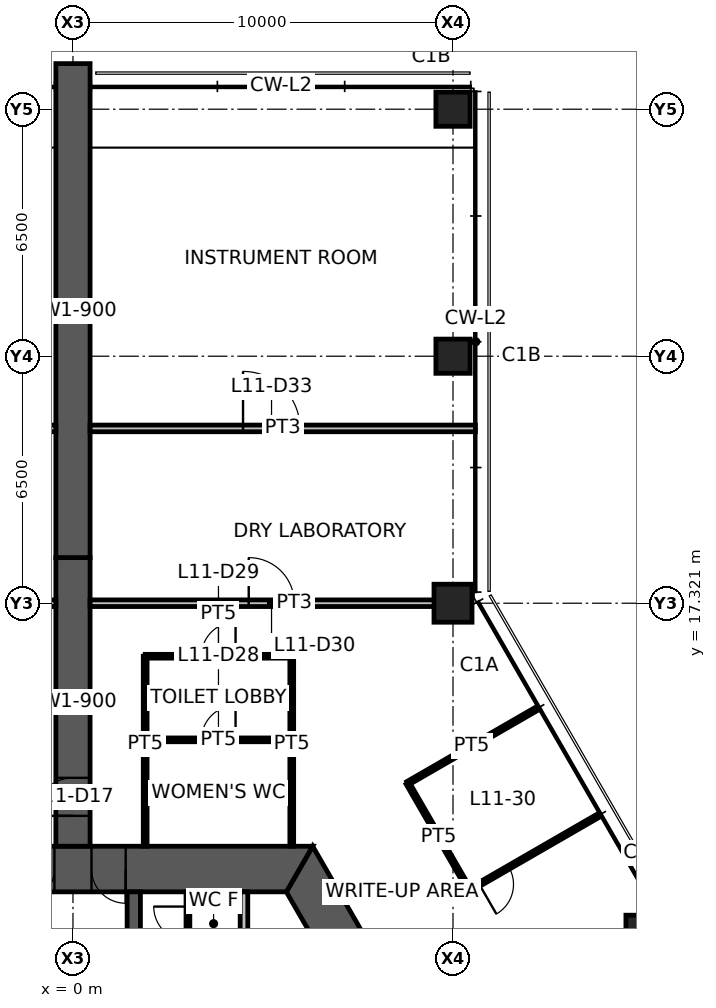
"""IFC4 building model, lengths in metres.
Left out: names, types, materials, properties, quantities, classifications, styles, units other than length and angle.
Written with IfcOpenShell. Run it as: python <this file> out.ifc"""

import sys

from ifc_helpers import new_model, si_unit, direction, frame, frame_2d, origin, origin_2d, place, context, subcontext, project, spatial, polyline, rectangle, hollow_rectangle, outline, extrude, element, fill, save


model = new_model("IFC4")
c1 = context("Model", 3, precision=1e-05, world=origin(), true_north=direction((0.0, 1.0)))
c2 = subcontext(c1, "Body", "Model", "MODEL_VIEW")
j1 = project(units=[si_unit("LENGTHUNIT", "METRE"), si_unit("PLANEANGLEUNIT", "RADIAN")], contexts=[c1])
p1 = place(None, origin())
s1 = spatial("IfcSite", under=j1, at=p1, CompositionType="ELEMENT")
p2 = place(p1, origin())
s2 = spatial("IfcBuilding", under=s1, at=p2, CompositionType="ELEMENT")
p3 = place(p2, frame((0.0, 0.0, 43.6)))
s3 = spatial("IfcBuildingStorey", under=s2, at=p3, CompositionType="ELEMENT", Elevation=43.6)
p4 = place(p3, frame((10.0, 17.321, 0.0), z_axis=(0.0, 0.0, 1.0), x_axis=(1.0, 0.0, 0.0)))
e1 = element("IfcColumn", 1, at=p4, inside=s3, PredefinedType="COLUMN", context=c2, shape_type="SweptSolid", body=[
    extrude(hollow_rectangle(XDim=1.0, YDim=1.0, WallThickness=0.06, at=origin_2d()), origin(), (0.0, 0.0, 1.0), 4.2),
])
for number, where, z_axis, x_axis in (
    (2, (15.0, 8.66, 0.0), (0.0, 0.0, 1.0), (1.0, 0.0, 0.0)),
    (3, (10.0, 23.821, 0.0), (0.0, 0.0, 1.0), (1.0, 0.0, 0.0)),
    (4, (10.0, 30.321, 0.0), (0.0, 0.0, 1.0), (1.0, 0.0, 0.0)),
):
    element("IfcColumn", number, at=place(p3, frame(where, z_axis=z_axis, x_axis=x_axis)), inside=s3, PredefinedType="COLUMN", context=c2, shape_type="SweptSolid", body=[
        extrude(hollow_rectangle(XDim=0.9, YDim=0.9, WallThickness=0.05, at=origin_2d()), origin(), (0.0, 0.0, 1.0), 4.2),
    ])
p5 = place(p3, frame((11.922, 0.0, 0.0), z_axis=(0.0, 0.0, 1.0), x_axis=(-0.500004296715, 0.866022923061, 0.0)))
e5 = element("IfcWall", 5, at=p5, inside=s3, PredefinedType="SHEAR", context=c2, shape_type="SweptSolid", body=[
    extrude(outline(polyline([(-0.346, -0.6), (5.835, -0.6), (6.635, -0.6), (12.269, -0.6), (11.576, 0.6), (6.635, 0.6), (5.835, 0.6), (0.346, 0.6), (-0.346, -0.6)])), origin(), (0.0, 0.0, 1.0), 4.2),
])
p6 = place(p5, frame((5.835, 0.0, 0.0)))
e6 = element("IfcOpeningElement", 6, at=p6, cuts=e5, PredefinedType="OPENING", context=c2, shape_type="SweptSolid", body=[
    extrude(rectangle(XDim=0.8, YDim=2.1, at=frame_2d((0.4, 1.05))), frame((0.0, 0.61, 0.0), z_axis=(0.0, -1.0, 0.0), x_axis=(1.0, 0.0, 0.0)), (0.0, 0.0, 1.0), 1.22),
])
p7 = place(p3, frame((5.961, 10.325, 0.0), z_axis=(0.0, 0.0, 1.0), x_axis=(-1.0, 0.0, 0.0)))
e7 = element("IfcWall", 7, at=p7, inside=s3, PredefinedType="SHEAR", context=c2, shape_type="SweptSolid", body=[
    extrude(outline(polyline([(-0.346, -0.6), (4.574, -0.6), (5.474, -0.6), (6.449, -0.6), (7.349, -0.6), (12.269, -0.6), (11.576, 0.6), (7.349, 0.6), (6.449, 0.6), (5.474, 0.6), (4.574, 0.6), (0.346, 0.6), (-0.346, -0.6)])), origin(), (0.0, 0.0, 1.0), 4.2),
])
p8 = place(p7, frame((6.449, 0.0, 0.0)))
e8 = element("IfcOpeningElement", 8, at=p8, cuts=e7, PredefinedType="OPENING", context=c2, shape_type="SweptSolid", body=[
    extrude(rectangle(XDim=0.9, YDim=2.1, at=frame_2d((0.45, 1.05))), frame((0.0, 0.61, 0.0), z_axis=(0.0, -1.0, 0.0), x_axis=(1.0, 0.0, 0.0)), (0.0, 0.0, 1.0), 1.22),
])
p9 = place(p7, frame((4.574, 0.0, 0.0)))
e9 = element("IfcOpeningElement", 9, at=p9, cuts=e7, PredefinedType="OPENING", context=c2, shape_type="SweptSolid", body=[
    extrude(rectangle(XDim=0.9, YDim=2.1, at=frame_2d((0.45, 1.05))), frame((0.0, 0.61, 0.0), z_axis=(0.0, -1.0, 0.0), x_axis=(1.0, 0.0, 0.0)), (0.0, 0.0, 1.0), 1.22),
])
p10 = place(p3, frame((0.0, 10.925, 0.0), z_axis=(0.0, 0.0, 1.0), x_axis=(0.0, 1.0, 0.0)))
e10 = element("IfcWall", 10, at=p10, inside=s3, PredefinedType="SHEAR", context=c2, shape_type="SweptSolid", body=[
    extrude(rectangle(XDim=7.595, YDim=0.9, at=frame_2d((3.798, 0.0))), origin(), (0.0, 0.0, 1.0), 4.2),
])
p11 = place(p10, frame((0.8, 0.0, 0.0)))
e11 = element("IfcOpeningElement", 11, at=p11, cuts=e10, PredefinedType="OPENING", context=c2, shape_type="SweptSolid", body=[
    extrude(rectangle(XDim=1.0, YDim=2.1, at=frame_2d((0.5, 1.05))), frame((0.0, 0.46, 0.0), z_axis=(0.0, -1.0, 0.0), x_axis=(1.0, 0.0, 0.0)), (0.0, 0.0, 1.0), 0.92),
])
p12 = place(p3, frame((0.0, 18.521, 0.0), z_axis=(0.0, 0.0, 1.0), x_axis=(0.0, 1.0, 0.0)))
e12 = element("IfcWall", 12, at=p12, inside=s3, PredefinedType="SHEAR", context=c2, shape_type="SweptSolid", body=[
    extrude(rectangle(XDim=13.0, YDim=0.9, at=frame_2d((6.5, 0.0))), origin(), (0.0, 0.0, 1.0), 4.2),
])
p13 = place(p3, frame((1.6, 3.775, 0.0), z_axis=(0.0, 0.0, 1.0), x_axis=(0.0, 1.0, 0.0)))
e13 = element("IfcWall", 13, at=p13, inside=s3, PredefinedType="SHEAR", context=c2, shape_type="SweptSolid", body=[
    extrude(rectangle(XDim=5.95, YDim=0.35, at=frame_2d((2.975, 0.0))), origin(), (0.0, 0.0, 1.0), 4.2),
])
p14 = place(p13, frame((3.775, 0.0, 0.0)))
e14 = element("IfcOpeningElement", 14, at=p14, cuts=e13, PredefinedType="OPENING", context=c2, shape_type="SweptSolid", body=[
    extrude(rectangle(XDim=0.9, YDim=2.1, at=frame_2d((0.45, 1.05))), frame((0.0, 0.185, 0.0), z_axis=(0.0, -1.0, 0.0), x_axis=(1.0, 0.0, 0.0)), (0.0, 0.0, 1.0), 0.37),
])
p15 = place(p3, frame((4.5, 7.175, 0.0), z_axis=(0.0, 0.0, 1.0), x_axis=(0.0, 1.0, 0.0)))
e15 = element("IfcWall", 15, at=p15, inside=s3, PredefinedType="STANDARD", context=c2, shape_type="SweptSolid", body=[
    extrude(rectangle(XDim=2.55, YDim=0.2, at=frame_2d((1.275, 0.0))), origin(), (0.0, 0.0, 1.0), 4.2),
])
p16 = place(p3, frame((3.025, 6.575, 0.0), z_axis=(0.0, 0.0, 1.0), x_axis=(0.0, 1.0, 0.0)))
e16 = element("IfcWall", 16, at=p16, inside=s3, PredefinedType="PARTITIONING", context=c2, shape_type="SweptSolid", body=[
    extrude(rectangle(XDim=3.15, YDim=0.1, at=frame_2d((1.575, 0.0))), origin(), (0.0, 0.0, 1.0), 3.23),
])
p17 = place(p16, frame((1.863, 0.0, 0.0)))
e17 = element("IfcOpeningElement", 17, at=p17, cuts=e16, PredefinedType="OPENING", context=c2, shape_type="SweptSolid", body=[
    extrude(rectangle(XDim=0.9, YDim=2.1, at=frame_2d((0.45, 1.05))), frame((0.0, 0.06, 0.0), z_axis=(0.0, -1.0, 0.0), x_axis=(1.0, 0.0, 0.0)), (0.0, 0.0, 1.0), 0.12),
])
p18 = place(p16, frame((0.363, 0.0, 0.0)))
e18 = element("IfcOpeningElement", 18, at=p18, cuts=e16, PredefinedType="OPENING", context=c2, shape_type="SweptSolid", body=[
    extrude(rectangle(XDim=0.9, YDim=2.1, at=frame_2d((0.45, 1.05))), frame((0.0, 0.06, 0.0), z_axis=(0.0, -1.0, 0.0), x_axis=(1.0, 0.0, 0.0)), (0.0, 0.0, 1.0), 0.12),
])
p19 = place(p3, frame((1.9, 13.725, 0.0), z_axis=(0.0, 0.0, 1.0), x_axis=(1.0, 0.0, 0.0)))
e19 = element("IfcWall", 19, at=p19, inside=s3, PredefinedType="PARTITIONING", context=c2, shape_type="SweptSolid", body=[
    extrude(rectangle(XDim=3.857, YDim=0.1, at=frame_2d((1.929, 0.0))), origin(), (0.0, 0.0, 1.0), 3.23),
])
p20 = place(p19, frame((1.479, 0.0, 0.0)))
e20 = element("IfcOpeningElement", 20, at=p20, cuts=e19, PredefinedType="OPENING", context=c2, shape_type="SweptSolid", body=[
    extrude(rectangle(XDim=0.9, YDim=2.1, at=frame_2d((0.45, 1.05))), frame((0.0, 0.06, 0.0), z_axis=(0.0, -1.0, 0.0), x_axis=(1.0, 0.0, 0.0)), (0.0, 0.0, 1.0), 0.12),
])
p21 = place(p3, frame((1.9, 15.925, 0.0), z_axis=(0.0, 0.0, 1.0), x_axis=(1.0, 0.0, 0.0)))
e21 = element("IfcWall", 21, at=p21, inside=s3, PredefinedType="PARTITIONING", context=c2, shape_type="SweptSolid", body=[
    extrude(rectangle(XDim=3.857, YDim=0.1, at=frame_2d((1.929, 0.0))), origin(), (0.0, 0.0, 1.0), 3.23),
])
p22 = place(p21, frame((1.479, 0.0, 0.0)))
e22 = element("IfcOpeningElement", 22, at=p22, cuts=e21, PredefinedType="OPENING", context=c2, shape_type="SweptSolid", body=[
    extrude(rectangle(XDim=0.9, YDim=2.1, at=frame_2d((0.45, 1.05))), frame((0.0, 0.06, 0.0), z_axis=(0.0, -1.0, 0.0), x_axis=(1.0, 0.0, 0.0)), (0.0, 0.0, 1.0), 0.12),
])
for number, where, z_axis, x_axis in (
    (23, (1.9, 10.925, 0.0), (0.0, 0.0, 1.0), (0.0, 1.0, 0.0)),
    (24, (5.757, 10.925, 0.0), (0.0, 0.0, 1.0), (0.0, 1.0, 0.0)),
):
    element("IfcWall", number, at=place(p3, frame(where, z_axis=z_axis, x_axis=x_axis)), inside=s3, PredefinedType="PARTITIONING", context=c2, shape_type="SweptSolid", body=[
        extrude(rectangle(XDim=5.0, YDim=0.1, at=frame_2d((2.5, 0.0))), origin(), (0.0, 0.0, 1.0), 3.23),
    ])
p23 = place(p3, frame((0.45, 17.321, 0.0), z_axis=(0.0, 0.0, 1.0), x_axis=(1.0, 0.0, 0.0)))
e25 = element("IfcWall", 25, at=p23, inside=s3, PredefinedType="PARTITIONING", context=c2, shape_type="SweptSolid", body=[
    extrude(rectangle(XDim=9.55, YDim=0.175, at=frame_2d((4.775, 0.0))), origin(), (0.0, 0.0, 1.0), 3.238),
])
p24 = place(p23, frame((4.175, 0.0, 0.0)))
e26 = element("IfcOpeningElement", 26, at=p24, cuts=e25, PredefinedType="OPENING", context=c2, shape_type="SweptSolid", body=[
    extrude(rectangle(XDim=1.2, YDim=2.1, at=frame_2d((0.6, 1.05))), frame((0.0, 0.098, 0.0), z_axis=(0.0, -1.0, 0.0), x_axis=(1.0, 0.0, 0.0)), (0.0, 0.0, 1.0), 0.195),
])
p25 = place(p3, frame((8.809, 12.583, 0.0), z_axis=(0.0, 0.0, 1.0), x_axis=(0.866027358884, 0.499996613652, 0.0)))
e27 = element("IfcWall", 27, at=p25, inside=s3, PredefinedType="PARTITIONING", context=c2, shape_type="SweptSolid", body=[
    extrude(rectangle(XDim=3.88, YDim=0.1, at=frame_2d((1.94, 0.0))), origin(), (0.0, 0.0, 1.0), 3.23),
])
p26 = place(p3, frame((10.432, 9.772, 0.0), z_axis=(0.0, 0.0, 1.0), x_axis=(-0.500013214685, 0.866017774148, 0.0)))
e28 = element("IfcWall", 28, at=p26, inside=s3, PredefinedType="PARTITIONING", context=c2, shape_type="SweptSolid", body=[
    extrude(rectangle(XDim=3.247, YDim=0.1, at=frame_2d((1.623, 0.0))), origin(), (0.0, 0.0, 1.0), 3.23),
])
p27 = place(p3, frame((13.792, 11.712, 0.0), z_axis=(0.0, 0.0, 1.0), x_axis=(-0.866027358884, -0.499996613652, 0.0)))
e29 = element("IfcWall", 29, at=p27, inside=s3, PredefinedType="PARTITIONING", context=c2, shape_type="SweptSolid", body=[
    extrude(rectangle(XDim=3.88, YDim=0.1, at=frame_2d((1.94, 0.0))), origin(), (0.0, 0.0, 1.0), 3.23),
])
p28 = place(p27, frame((2.68, 0.0, 0.0)))
e30 = element("IfcOpeningElement", 30, at=p28, cuts=e29, PredefinedType="OPENING", context=c2, shape_type="SweptSolid", body=[
    extrude(rectangle(XDim=0.9, YDim=2.1, at=frame_2d((0.45, 1.05))), frame((0.0, 0.06, 0.0), z_axis=(0.0, -1.0, 0.0), x_axis=(1.0, 0.0, 0.0)), (0.0, 0.0, 1.0), 0.12),
])
p29 = place(p3, frame((0.45, 21.92, 0.0), z_axis=(0.0, 0.0, 1.0), x_axis=(1.0, 0.0, 0.0)))
e31 = element("IfcWall", 31, at=p29, inside=s3, PredefinedType="PARTITIONING", context=c2, shape_type="SweptSolid", body=[
    extrude(rectangle(XDim=10.14, YDim=0.175, at=frame_2d((5.07, 0.0))), origin(), (0.0, 0.0, 1.0), 4.03),
])
p30 = place(p29, frame((4.025, 0.0, 0.0)))
e32 = element("IfcOpeningElement", 32, at=p30, cuts=e31, PredefinedType="OPENING", context=c2, shape_type="SweptSolid", body=[
    extrude(rectangle(XDim=1.5, YDim=2.1, at=frame_2d((0.75, 1.05))), frame((0.0, 0.098, 0.0), z_axis=(0.0, -1.0, 0.0), x_axis=(1.0, 0.0, 0.0)), (0.0, 0.0, 1.0), 0.195),
])
p31 = place(p3, frame((-0.45, 17.321, 0.0), z_axis=(0.0, 0.0, 1.0), x_axis=(-1.0, 0.0, 0.0)))
e33 = element("IfcWall", 33, at=p31, inside=s3, PredefinedType="PARTITIONING", context=c2, shape_type="SweptSolid", body=[
    extrude(rectangle(XDim=9.55, YDim=0.175, at=frame_2d((4.775, 0.0))), origin(), (0.0, 0.0, 1.0), 3.238),
])
p32 = place(p31, frame((4.175, 0.0, 0.0)))
e34 = element("IfcOpeningElement", 34, at=p32, cuts=e33, PredefinedType="OPENING", context=c2, shape_type="SweptSolid", body=[
    extrude(rectangle(XDim=1.2, YDim=2.1, at=frame_2d((0.6, 1.05))), frame((0.0, 0.098, 0.0), z_axis=(0.0, -1.0, 0.0), x_axis=(1.0, 0.0, 0.0)), (0.0, 0.0, 1.0), 0.195),
])
p33 = place(p3, frame((-0.45, 21.92, 0.0), z_axis=(0.0, 0.0, 1.0), x_axis=(-1.0, 0.0, 0.0)))
e35 = element("IfcWall", 35, at=p33, inside=s3, PredefinedType="PARTITIONING", context=c2, shape_type="SweptSolid", body=[
    extrude(rectangle(XDim=10.14, YDim=0.175, at=frame_2d((5.07, 0.0))), origin(), (0.0, 0.0, 1.0), 4.03),
])
p34 = place(p33, frame((4.025, 0.0, 0.0)))
e36 = element("IfcOpeningElement", 36, at=p34, cuts=e35, PredefinedType="OPENING", context=c2, shape_type="SweptSolid", body=[
    extrude(rectangle(XDim=1.5, YDim=2.1, at=frame_2d((0.75, 1.05))), frame((0.0, 0.098, 0.0), z_axis=(0.0, -1.0, 0.0), x_axis=(1.0, 0.0, 0.0)), (0.0, 0.0, 1.0), 0.195),
])
p35 = place(p8, origin())
e37 = element("IfcDoor", 37, at=p35, inside=s3, OperationType="SINGLE_SWING_RIGHT", PredefinedType="DOOR", context=c2, shape_type="SweptSolid", body=[
    extrude(rectangle(XDim=0.9, YDim=2.1, at=frame_2d((0.45, 1.05))), frame((0.0, 0.025, 0.0), z_axis=(0.0, -1.0, 0.0), x_axis=(1.0, 0.0, 0.0)), (0.0, 0.0, 1.0), 0.05),
])
fill(e8, e37)
p36 = place(p9, origin())
e38 = element("IfcDoor", 38, at=p36, inside=s3, OperationType="SINGLE_SWING_LEFT", PredefinedType="DOOR", context=c2, shape_type="SweptSolid", body=[
    extrude(rectangle(XDim=0.9, YDim=2.1, at=frame_2d((0.45, 1.05))), frame((0.0, 0.025, 0.0), z_axis=(0.0, -1.0, 0.0), x_axis=(1.0, 0.0, 0.0)), (0.0, 0.0, 1.0), 0.05),
])
fill(e9, e38)
p37 = place(p11, origin())
e39 = element("IfcDoor", 39, at=p37, inside=s3, OperationType="SINGLE_SWING_LEFT", PredefinedType="DOOR", context=c2, shape_type="SweptSolid", body=[
    extrude(rectangle(XDim=1.0, YDim=2.1, at=frame_2d((0.5, 1.05))), frame((0.0, 0.025, 0.0), z_axis=(0.0, -1.0, 0.0), x_axis=(1.0, 0.0, 0.0)), (0.0, 0.0, 1.0), 0.05),
])
fill(e11, e39)
p38 = place(p17, origin())
e40 = element("IfcDoor", 40, at=p38, inside=s3, OperationType="SINGLE_SWING_RIGHT", PredefinedType="DOOR", context=c2, shape_type="SweptSolid", body=[
    extrude(rectangle(XDim=0.9, YDim=2.1, at=frame_2d((0.45, 1.05))), frame((0.0, 0.025, 0.0), z_axis=(0.0, -1.0, 0.0), x_axis=(1.0, 0.0, 0.0)), (0.0, 0.0, 1.0), 0.05),
])
fill(e17, e40)
p39 = place(p20, origin())
e41 = element("IfcDoor", 41, at=p39, inside=s3, OperationType="SINGLE_SWING_RIGHT", PredefinedType="DOOR", context=c2, shape_type="SweptSolid", body=[
    extrude(rectangle(XDim=0.9, YDim=2.1, at=frame_2d((0.45, 1.05))), frame((0.0, 0.025, 0.0), z_axis=(0.0, -1.0, 0.0), x_axis=(1.0, 0.0, 0.0)), (0.0, 0.0, 1.0), 0.05),
])
fill(e20, e41)
p40 = place(p22, origin())
e42 = element("IfcDoor", 42, at=p40, inside=s3, OperationType="SINGLE_SWING_RIGHT", PredefinedType="DOOR", context=c2, shape_type="SweptSolid", body=[
    extrude(rectangle(XDim=0.9, YDim=2.1, at=frame_2d((0.45, 1.05))), frame((0.0, 0.025, 0.0), z_axis=(0.0, -1.0, 0.0), x_axis=(1.0, 0.0, 0.0)), (0.0, 0.0, 1.0), 0.05),
])
fill(e22, e42)
p41 = place(p24, origin())
e43 = element("IfcDoor", 43, at=p41, inside=s3, OperationType="DOUBLE_DOOR_SINGLE_SWING", PredefinedType="DOOR", context=c2, shape_type="SweptSolid", body=[
    extrude(rectangle(XDim=1.2, YDim=2.1, at=frame_2d((0.6, 1.05))), frame((0.0, 0.025, 0.0), z_axis=(0.0, -1.0, 0.0), x_axis=(1.0, 0.0, 0.0)), (0.0, 0.0, 1.0), 0.05),
])
fill(e26, e43)
p42 = place(p28, origin())
e44 = element("IfcDoor", 44, at=p42, inside=s3, OperationType="SINGLE_SWING_RIGHT", PredefinedType="DOOR", context=c2, shape_type="SweptSolid", body=[
    extrude(rectangle(XDim=0.9, YDim=2.1, at=frame_2d((0.45, 1.05))), frame((0.0, 0.025, 0.0), z_axis=(0.0, -1.0, 0.0), x_axis=(1.0, 0.0, 0.0)), (0.0, 0.0, 1.0), 0.05),
])
fill(e30, e44)
p43 = place(p30, origin())
e45 = element("IfcDoor", 45, at=p43, inside=s3, OperationType="DOUBLE_DOOR_SINGLE_SWING", PredefinedType="DOOR", context=c2, shape_type="SweptSolid", body=[
    extrude(rectangle(XDim=1.5, YDim=2.1, at=frame_2d((0.75, 1.05))), frame((0.0, 0.025, 0.0), z_axis=(0.0, -1.0, 0.0), x_axis=(1.0, 0.0, 0.0)), (0.0, 0.0, 1.0), 0.05),
])
fill(e32, e45)
save(model, sys.argv[1])
